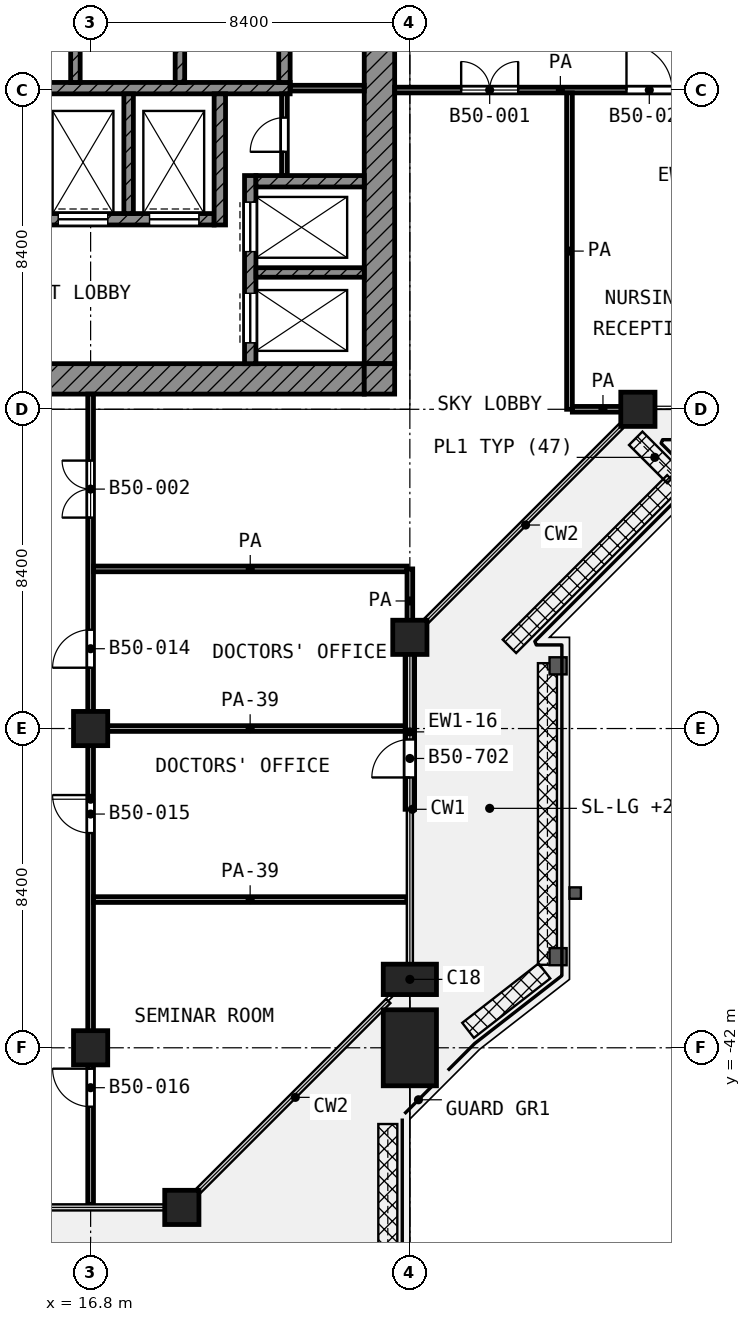
"""IFC4 building model, lengths in metres.
Left out: names, types, materials, properties, quantities, classifications, styles, units other than length and angle.
Written with IfcOpenShell. Run it as: python <this file> out.ifc"""

import sys

from ifc_helpers import new_model, si_unit, direction, frame, frame_2d, origin, origin_2d, place, context, subcontext, project, spatial, rectangle, extrude, element, fill, save


model = new_model("IFC4")
c1 = context("Model", 3, precision=1e-05, world=origin(), true_north=direction((0.0, 1.0)))
c2 = subcontext(c1, "Body", "Model", "MODEL_VIEW")
j1 = project(units=[si_unit("LENGTHUNIT", "METRE"), si_unit("PLANEANGLEUNIT", "RADIAN")], contexts=[c1])
p1 = place(None, origin())
s1 = spatial("IfcSite", under=j1, at=p1, CompositionType="ELEMENT")
p2 = place(p1, origin())
s2 = spatial("IfcBuilding", under=s1, at=p2, CompositionType="ELEMENT")
p3 = place(p2, frame((0.0, 0.0, 218.0)))
s3 = spatial("IfcBuildingStorey", under=s2, at=p3, CompositionType="ELEMENT", Elevation=218.0)
for number, where, z_axis, x_axis in (
    (1, (31.2, -25.2, 0.0), (0.0, 0.0, 1.0), (1.0, 0.0, 0.0)),
    (2, (25.2, -31.2, 0.0), (0.0, 0.0, 1.0), (1.0, 0.0, 0.0)),
    (3, (16.8, -33.6, 0.0), (0.0, 0.0, 1.0), (1.0, 0.0, 0.0)),
):
    element("IfcColumn", number, at=place(p3, frame(where, z_axis=z_axis, x_axis=x_axis)), inside=s3, PredefinedType="COLUMN", context=c2, shape_type="SweptSolid", body=[
        extrude(rectangle(XDim=0.9, YDim=0.9, at=origin_2d()), origin(), (0.0, 0.0, 1.0), 4.2),
    ])
p4 = place(p3, frame((25.2, -40.2, 0.0), z_axis=(0.0, 0.0, 1.0), x_axis=(0.0, -1.0, 0.0)))
e4 = element("IfcColumn", 4, at=p4, inside=s3, PredefinedType="COLUMN", context=c2, shape_type="SweptSolid", body=[
    extrude(rectangle(XDim=0.8, YDim=1.4, at=origin_2d()), origin(), (0.0, 0.0, 1.0), 4.2),
])
for number, where, z_axis, x_axis in (
    (5, (16.8, -42.0, 0.0), (0.0, 0.0, 1.0), (1.0, 0.0, 0.0)),
    (6, (19.2, -46.2, 0.0), (0.0, 0.0, 1.0), (1.0, 0.0, 0.0)),
):
    element("IfcColumn", number, at=place(p3, frame(where, z_axis=z_axis, x_axis=x_axis)), inside=s3, PredefinedType="COLUMN", context=c2, shape_type="SweptSolid", body=[
        extrude(rectangle(XDim=0.9, YDim=0.9, at=origin_2d()), origin(), (0.0, 0.0, 1.0), 4.2),
    ])
p5 = place(p3, frame((25.2, -42.0, 0.0), z_axis=(0.0, 0.0, 1.0), x_axis=(0.0, -1.0, 0.0)))
e7 = element("IfcColumn", 7, at=p5, inside=s3, PredefinedType="COLUMN", context=c2, shape_type="SweptSolid", body=[
    extrude(rectangle(XDim=2.0, YDim=1.4, at=origin_2d()), origin(), (0.0, 0.0, 1.0), 4.2),
])
p6 = place(p3, frame((25.2, -35.725, 0.0), z_axis=(0.0, 0.0, 1.0), x_axis=(0.0, 1.0, 0.0)))
e8 = element("IfcWall", 8, at=p6, inside=s3, PredefinedType="SOLIDWALL", context=c2, shape_type="SweptSolid", body=[
    extrude(rectangle(XDim=4.075, YDim=0.25, at=frame_2d((2.038, 0.0))), origin(), (0.0, 0.0, 1.0), 2.58),
])
p7 = place(p6, frame((0.837, 0.0, 0.0)))
e9 = element("IfcOpeningElement", 9, at=p7, cuts=e8, PredefinedType="OPENING", context=c2, shape_type="SweptSolid", body=[
    extrude(rectangle(XDim=1.0, YDim=2.1, at=frame_2d((0.5, 1.05))), frame((0.0, 0.135, 0.0), z_axis=(0.0, -1.0, 0.0), x_axis=(1.0, 0.0, 0.0)), (0.0, 0.0, 1.0), 0.27),
])
p8 = place(p3, frame((24.4, -24.0, 0.0), z_axis=(0.0, 0.0, 1.0), x_axis=(0.0, 1.0, 0.0)))
e10 = element("IfcWall", 10, at=p8, inside=s3, PredefinedType="SHEAR", context=c2, shape_type="SweptSolid", body=[
    extrude(rectangle(XDim=18.6, YDim=0.8, at=frame_2d((9.3, 0.0))), origin(), (0.0, 0.0, 1.0), 3.6),
])
p9 = place(p8, frame((10.5, 0.0, 0.0)))
e11 = element("IfcOpeningElement", 11, at=p9, cuts=e10, PredefinedType="OPENING", context=c2, shape_type="SweptSolid", body=[
    extrude(rectangle(XDim=1.8, YDim=2.1, at=frame_2d((0.9, 1.05))), frame((0.0, 0.41, 0.0), z_axis=(0.0, -1.0, 0.0), x_axis=(1.0, 0.0, 0.0)), (0.0, 0.0, 1.0), 0.82),
])
p10 = place(p3, frame((5.4, -24.4, 0.0), z_axis=(0.0, 0.0, 1.0), x_axis=(1.0, 0.0, 0.0)))
e12 = element("IfcWall", 12, at=p10, inside=s3, PredefinedType="SHEAR", context=c2, shape_type="SweptSolid", body=[
    extrude(rectangle(XDim=18.6, YDim=0.8, at=frame_2d((9.3, 0.0))), origin(), (0.0, 0.0, 1.0), 3.6),
])
p11 = place(p10, frame((6.3, 0.0, 0.0)))
e13 = element("IfcOpeningElement", 13, at=p11, cuts=e12, PredefinedType="OPENING", context=c2, shape_type="SweptSolid", body=[
    extrude(rectangle(XDim=1.8, YDim=2.1, at=frame_2d((0.9, 1.05))), frame((0.0, 0.41, 0.0), z_axis=(0.0, -1.0, 0.0), x_axis=(1.0, 0.0, 0.0)), (0.0, 0.0, 1.0), 0.82),
])
p12 = place(p3, frame((24.4, -24.8, 0.0), z_axis=(0.0, 0.0, 1.0), x_axis=(0.0, 1.0, 0.0)))
e14 = element("IfcWall", 14, at=p12, inside=s3, PredefinedType="SHEAR", context=c2, shape_type="SweptSolid", body=[
    extrude(rectangle(XDim=0.8, YDim=0.8, at=frame_2d((0.4, 0.0))), origin(), (0.0, 0.0, 1.0), 3.6),
])
p13 = place(p3, frame((5.4, -16.75, 0.0), z_axis=(0.0, 0.0, 1.0), x_axis=(1.0, 0.0, 0.0)))
e15 = element("IfcWall", 15, at=p13, inside=s3, PredefinedType="SHEAR", context=c2, shape_type="SweptSolid", body=[
    extrude(rectangle(XDim=16.65, YDim=0.3, at=frame_2d((8.325, 0.0))), origin(), (0.0, 0.0, 1.0), 3.6),
])
p14 = place(p3, frame((5.4, -20.2, 0.0), z_axis=(0.0, 0.0, 1.0), x_axis=(1.0, 0.0, 0.0)))
e16 = element("IfcWall", 16, at=p14, inside=s3, PredefinedType="SHEAR", context=c2, shape_type="SweptSolid", body=[
    extrude(rectangle(XDim=14.65, YDim=0.3, at=frame_2d((7.325, 0.0))), origin(), (0.0, 0.0, 1.0), 3.6),
])
p15 = place(p14, frame((10.55, 0.0, 0.0)))
e17 = element("IfcOpeningElement", 17, at=p15, cuts=e16, PredefinedType="OPENING", context=c2, shape_type="SweptSolid", body=[
    extrude(rectangle(XDim=1.3, YDim=2.1, at=frame_2d((0.65, 1.05))), frame((0.0, 0.16, 0.0), z_axis=(0.0, -1.0, 0.0), x_axis=(1.0, 0.0, 0.0)), (0.0, 0.0, 1.0), 0.32),
])
p16 = place(p14, frame((12.95, 0.0, 0.0)))
e18 = element("IfcOpeningElement", 18, at=p16, cuts=e16, PredefinedType="OPENING", context=c2, shape_type="SweptSolid", body=[
    extrude(rectangle(XDim=1.3, YDim=2.1, at=frame_2d((0.65, 1.05))), frame((0.0, 0.16, 0.0), z_axis=(0.0, -1.0, 0.0), x_axis=(1.0, 0.0, 0.0)), (0.0, 0.0, 1.0), 0.32),
])
p17 = place(p14, frame((0.55, 0.0, 0.0)))
e19 = element("IfcOpeningElement", 19, at=p17, cuts=e16, PredefinedType="OPENING", context=c2, shape_type="SweptSolid", body=[
    extrude(rectangle(XDim=1.3, YDim=2.1, at=frame_2d((0.65, 1.05))), frame((0.0, 0.16, 0.0), z_axis=(0.0, -1.0, 0.0), x_axis=(1.0, 0.0, 0.0)), (0.0, 0.0, 1.0), 0.32),
])
p18 = place(p14, frame((2.95, 0.0, 0.0)))
e20 = element("IfcOpeningElement", 20, at=p18, cuts=e16, PredefinedType="OPENING", context=c2, shape_type="SweptSolid", body=[
    extrude(rectangle(XDim=1.3, YDim=2.1, at=frame_2d((0.65, 1.05))), frame((0.0, 0.16, 0.0), z_axis=(0.0, -1.0, 0.0), x_axis=(1.0, 0.0, 0.0)), (0.0, 0.0, 1.0), 0.32),
])
p19 = place(p14, frame((5.95, 0.0, 0.0)))
e21 = element("IfcOpeningElement", 21, at=p19, cuts=e16, PredefinedType="OPENING", context=c2, shape_type="SweptSolid", body=[
    extrude(rectangle(XDim=0.9, YDim=2.1, at=frame_2d((0.45, 1.05))), frame((0.0, 0.16, 0.0), z_axis=(0.0, -1.0, 0.0), x_axis=(1.0, 0.0, 0.0)), (0.0, 0.0, 1.0), 0.32),
])
p20 = place(p14, frame((8.35, 0.0, 0.0)))
e22 = element("IfcOpeningElement", 22, at=p20, cuts=e16, PredefinedType="OPENING", context=c2, shape_type="SweptSolid", body=[
    extrude(rectangle(XDim=0.9, YDim=2.1, at=frame_2d((0.45, 1.05))), frame((0.0, 0.16, 0.0), z_axis=(0.0, -1.0, 0.0), x_axis=(1.0, 0.0, 0.0)), (0.0, 0.0, 1.0), 0.32),
])
p21 = place(p3, frame((20.2, -20.35, 0.0), z_axis=(0.0, 0.0, 1.0), x_axis=(0.0, 1.0, 0.0)))
e23 = element("IfcWall", 23, at=p21, inside=s3, PredefinedType="SHEAR", context=c2, shape_type="SweptSolid", body=[
    extrude(rectangle(XDim=3.45, YDim=0.3, at=frame_2d((1.725, 0.0))), origin(), (0.0, 0.0, 1.0), 3.6),
])
p22 = place(p3, frame((21.9, -16.6, 0.0), z_axis=(0.0, 0.0, 1.0), x_axis=(0.0, 1.0, 0.0)))
e24 = element("IfcWall", 24, at=p22, inside=s3, PredefinedType="SHEAR", context=c2, shape_type="SweptSolid", body=[
    extrude(rectangle(XDim=2.35, YDim=0.3, at=frame_2d((1.175, 0.0))), origin(), (0.0, 0.0, 1.0), 3.6),
])
p23 = place(p3, frame((21.15, -19.2, 0.0), z_axis=(0.0, 0.0, 1.0), x_axis=(1.0, 0.0, 0.0)))
e25 = element("IfcWall", 25, at=p23, inside=s3, PredefinedType="SHEAR", context=c2, shape_type="SweptSolid", body=[
    extrude(rectangle(XDim=2.85, YDim=0.3, at=frame_2d((1.425, 0.0))), origin(), (0.0, 0.0, 1.0), 3.6),
])
p24 = place(p3, frame((21.0, -24.0, 0.0), z_axis=(0.0, 0.0, 1.0), x_axis=(0.0, 1.0, 0.0)))
e26 = element("IfcWall", 26, at=p24, inside=s3, PredefinedType="SHEAR", context=c2, shape_type="SweptSolid", body=[
    extrude(rectangle(XDim=4.95, YDim=0.3, at=frame_2d((2.475, 0.0))), origin(), (0.0, 0.0, 1.0), 3.6),
])
p25 = place(p24, frame((2.95, 0.0, 0.0)))
e27 = element("IfcOpeningElement", 27, at=p25, cuts=e26, PredefinedType="OPENING", context=c2, shape_type="SweptSolid", body=[
    extrude(rectangle(XDim=1.3, YDim=2.1, at=frame_2d((0.65, 1.05))), frame((0.0, 0.16, 0.0), z_axis=(0.0, -1.0, 0.0), x_axis=(1.0, 0.0, 0.0)), (0.0, 0.0, 1.0), 0.32),
])
p26 = place(p24, frame((0.55, 0.0, 0.0)))
e28 = element("IfcOpeningElement", 28, at=p26, cuts=e26, PredefinedType="OPENING", context=c2, shape_type="SweptSolid", body=[
    extrude(rectangle(XDim=1.3, YDim=2.1, at=frame_2d((0.65, 1.05))), frame((0.0, 0.16, 0.0), z_axis=(0.0, -1.0, 0.0), x_axis=(1.0, 0.0, 0.0)), (0.0, 0.0, 1.0), 0.32),
])
p27 = place(p3, frame((21.15, -21.6, 0.0), z_axis=(0.0, 0.0, 1.0), x_axis=(1.0, 0.0, 0.0)))
e29 = element("IfcWall", 29, at=p27, inside=s3, PredefinedType="SHEAR", context=c2, shape_type="SweptSolid", body=[
    extrude(rectangle(XDim=2.85, YDim=0.25, at=frame_2d((1.425, 0.0))), origin(), (0.0, 0.0, 1.0), 3.6),
])
p28 = place(p3, frame((17.8, -20.05, 0.0), z_axis=(0.0, 0.0, 1.0), x_axis=(0.0, 1.0, 0.0)))
e30 = element("IfcWall", 30, at=p28, inside=s3, PredefinedType="SHEAR", context=c2, shape_type="SweptSolid", body=[
    extrude(rectangle(XDim=3.15, YDim=0.25, at=frame_2d((1.575, 0.0))), origin(), (0.0, 0.0, 1.0), 3.6),
])
for number, where, z_axis, x_axis in (
    (31, (16.4, -16.6, 0.0), (0.0, 0.0, 1.0), (0.0, 1.0, 0.0)),
    (32, (19.15, -16.6, 0.0), (0.0, 0.0, 1.0), (0.0, 1.0, 0.0)),
):
    element("IfcWall", number, at=place(p3, frame(where, z_axis=z_axis, x_axis=x_axis)), inside=s3, PredefinedType="SHEAR", context=c2, shape_type="SweptSolid", body=[
        extrude(rectangle(XDim=2.35, YDim=0.25, at=frame_2d((1.175, 0.0))), origin(), (0.0, 0.0, 1.0), 3.6),
    ])
p29 = place(p3, frame((21.9, -19.05, 0.0), z_axis=(0.0, 0.0, 1.0), x_axis=(0.0, 1.0, 0.0)))
e33 = element("IfcWall", 33, at=p29, inside=s3, PredefinedType="PARTITIONING", context=c2, shape_type="SweptSolid", body=[
    extrude(rectangle(XDim=2.15, YDim=0.15, at=frame_2d((1.075, 0.0))), origin(), (0.0, 0.0, 1.0), 3.6),
])
p30 = place(p29, frame((0.625, 0.0, 0.0)))
e34 = element("IfcOpeningElement", 34, at=p30, cuts=e33, PredefinedType="OPENING", context=c2, shape_type="SweptSolid", body=[
    extrude(rectangle(XDim=0.9, YDim=2.1, at=frame_2d((0.45, 1.05))), frame((0.0, 0.085, 0.0), z_axis=(0.0, -1.0, 0.0), x_axis=(1.0, 0.0, 0.0)), (0.0, 0.0, 1.0), 0.17),
])
p31 = place(p3, frame((22.05, -16.75, 0.0), z_axis=(0.0, 0.0, 1.0), x_axis=(1.0, 0.0, 0.0)))
e35 = element("IfcWall", 35, at=p31, inside=s3, PredefinedType="PARTITIONING", context=c2, shape_type="SweptSolid", body=[
    extrude(rectangle(XDim=1.95, YDim=0.15, at=frame_2d((0.975, 0.0))), origin(), (0.0, 0.0, 1.0), 3.6),
])
for number, where, z_axis, x_axis in (
    (36, (16.875, -38.1, 0.0), (0.0, 0.0, 1.0), (1.0, 0.0, 0.0)),
    (37, (16.875, -33.6, 0.0), (0.0, 0.0, 1.0), (1.0, 0.0, 0.0)),
):
    element("IfcWall", number, at=place(p3, frame(where, z_axis=z_axis, x_axis=x_axis)), inside=s3, PredefinedType="PARTITIONING", context=c2, shape_type="SweptSolid", body=[
        extrude(rectangle(XDim=8.245, YDim=0.15, at=frame_2d((4.123, 0.0))), origin(), (0.0, 0.0, 1.0), 2.7),
    ])
p32 = place(p3, frame((16.875, -29.4, 0.0), z_axis=(0.0, 0.0, 1.0), x_axis=(1.0, 0.0, 0.0)))
e38 = element("IfcWall", 38, at=p32, inside=s3, PredefinedType="PARTITIONING", context=c2, shape_type="SweptSolid", body=[
    extrude(rectangle(XDim=8.25, YDim=0.15, at=frame_2d((4.125, 0.0))), origin(), (0.0, 0.0, 1.0), 3.6),
])
p33 = place(p3, frame((29.475, -25.2, 0.0), z_axis=(0.0, 0.0, 1.0), x_axis=(1.0, 0.0, 0.0)))
e39 = element("IfcWall", 39, at=p33, inside=s3, PredefinedType="PARTITIONING", context=c2, shape_type="SweptSolid", body=[
    extrude(rectangle(XDim=1.612, YDim=0.15, at=frame_2d((0.806, 0.0))), origin(), (0.0, 0.0, 1.0), 3.6),
])
p34 = place(p3, frame((24.8, -16.8, 0.0), z_axis=(0.0, 0.0, 1.0), x_axis=(1.0, 0.0, 0.0)))
e40 = element("IfcWall", 40, at=p34, inside=s3, PredefinedType="PARTITIONING", context=c2, shape_type="SweptSolid", body=[
    extrude(rectangle(XDim=8.72, YDim=0.15, at=frame_2d((4.36, 0.0))), origin(), (0.0, 0.0, 1.0), 3.6),
])
p35 = place(p34, frame((1.75, 0.0, 0.0)))
e41 = element("IfcOpeningElement", 41, at=p35, cuts=e40, PredefinedType="OPENING", context=c2, shape_type="SweptSolid", body=[
    extrude(rectangle(XDim=1.5, YDim=2.1, at=frame_2d((0.75, 1.05))), frame((0.0, 0.085, 0.0), z_axis=(0.0, -1.0, 0.0), x_axis=(1.0, 0.0, 0.0)), (0.0, 0.0, 1.0), 0.17),
])
p36 = place(p34, frame((6.1, 0.0, 0.0)))
e42 = element("IfcOpeningElement", 42, at=p36, cuts=e40, PredefinedType="OPENING", context=c2, shape_type="SweptSolid", body=[
    extrude(rectangle(XDim=1.2, YDim=2.1, at=frame_2d((0.6, 1.05))), frame((0.0, 0.085, 0.0), z_axis=(0.0, -1.0, 0.0), x_axis=(1.0, 0.0, 0.0)), (0.0, 0.0, 1.0), 0.17),
])
p37 = place(p3, frame((16.8, -46.12, 0.0), z_axis=(0.0, 0.0, 1.0), x_axis=(0.0, 1.0, 0.0)))
e43 = element("IfcWall", 43, at=p37, inside=s3, PredefinedType="PARTITIONING", context=c2, shape_type="SweptSolid", body=[
    extrude(rectangle(XDim=21.32, YDim=0.15, at=frame_2d((10.66, 0.0))), origin(), (0.0, 0.0, 1.0), 3.6),
])
p38 = place(p37, frame((18.07, 0.0, 0.0)))
e44 = element("IfcOpeningElement", 44, at=p38, cuts=e43, PredefinedType="OPENING", context=c2, shape_type="SweptSolid", body=[
    extrude(rectangle(XDim=1.5, YDim=2.1, at=frame_2d((0.75, 1.05))), frame((0.0, 0.085, 0.0), z_axis=(0.0, -1.0, 0.0), x_axis=(1.0, 0.0, 0.0)), (0.0, 0.0, 1.0), 0.17),
])
p39 = place(p37, frame((14.12, 0.0, 0.0)))
e45 = element("IfcOpeningElement", 45, at=p39, cuts=e43, PredefinedType="OPENING", context=c2, shape_type="SweptSolid", body=[
    extrude(rectangle(XDim=1.0, YDim=2.1, at=frame_2d((0.5, 1.05))), frame((0.0, 0.085, 0.0), z_axis=(0.0, -1.0, 0.0), x_axis=(1.0, 0.0, 0.0)), (0.0, 0.0, 1.0), 0.17),
])
p40 = place(p37, frame((9.77, 0.0, 0.0)))
e46 = element("IfcOpeningElement", 46, at=p40, cuts=e43, PredefinedType="OPENING", context=c2, shape_type="SweptSolid", body=[
    extrude(rectangle(XDim=1.0, YDim=2.1, at=frame_2d((0.5, 1.05))), frame((0.0, 0.085, 0.0), z_axis=(0.0, -1.0, 0.0), x_axis=(1.0, 0.0, 0.0)), (0.0, 0.0, 1.0), 0.17),
])
p41 = place(p37, frame((2.57, 0.0, 0.0)))
e47 = element("IfcOpeningElement", 47, at=p41, cuts=e43, PredefinedType="OPENING", context=c2, shape_type="SweptSolid", body=[
    extrude(rectangle(XDim=1.0, YDim=2.1, at=frame_2d((0.5, 1.05))), frame((0.0, 0.085, 0.0), z_axis=(0.0, -1.0, 0.0), x_axis=(1.0, 0.0, 0.0)), (0.0, 0.0, 1.0), 0.17),
])
p42 = place(p3, frame((25.2, -31.087, 0.0), z_axis=(0.0, 0.0, 1.0), x_axis=(0.0, 1.0, 0.0)))
e48 = element("IfcWall", 48, at=p42, inside=s3, PredefinedType="PARTITIONING", context=c2, shape_type="SweptSolid", body=[
    extrude(rectangle(XDim=1.687, YDim=0.15, at=frame_2d((0.844, 0.0))), origin(), (0.0, 0.0, 1.0), 3.6),
])
p43 = place(p3, frame((29.4, -25.2, 0.0), z_axis=(0.0, 0.0, 1.0), x_axis=(0.0, 1.0, 0.0)))
e49 = element("IfcWall", 49, at=p43, inside=s3, PredefinedType="PARTITIONING", context=c2, shape_type="SweptSolid", body=[
    extrude(rectangle(XDim=8.325, YDim=0.15, at=frame_2d((4.163, 0.0))), origin(), (0.0, 0.0, 1.0), 3.6),
])
p44 = place(p7, origin())
e50 = element("IfcDoor", 50, at=p44, inside=s3, OperationType="SINGLE_SWING_LEFT", PredefinedType="DOOR", context=c2, shape_type="SweptSolid", body=[
    extrude(rectangle(XDim=1.0, YDim=2.1, at=frame_2d((0.5, 1.05))), frame((0.0, 0.025, 0.0), z_axis=(0.0, -1.0, 0.0), x_axis=(1.0, 0.0, 0.0)), (0.0, 0.0, 1.0), 0.05),
])
fill(e9, e50)
p45 = place(p25, origin())
e51 = element("IfcDoor", 51, at=p45, inside=s3, OperationType="DOUBLE_DOOR_SLIDING", PredefinedType="DOOR", context=c2, shape_type="SweptSolid", body=[
    extrude(rectangle(XDim=1.3, YDim=2.1, at=frame_2d((0.65, 1.05))), frame((0.0, 0.025, 0.0), z_axis=(0.0, -1.0, 0.0), x_axis=(1.0, 0.0, 0.0)), (0.0, 0.0, 1.0), 0.05),
])
fill(e27, e51)
p46 = place(p26, origin())
e52 = element("IfcDoor", 52, at=p46, inside=s3, OperationType="DOUBLE_DOOR_SLIDING", PredefinedType="DOOR", context=c2, shape_type="SweptSolid", body=[
    extrude(rectangle(XDim=1.3, YDim=2.1, at=frame_2d((0.65, 1.05))), frame((0.0, 0.025, 0.0), z_axis=(0.0, -1.0, 0.0), x_axis=(1.0, 0.0, 0.0)), (0.0, 0.0, 1.0), 0.05),
])
fill(e28, e52)
p47 = place(p15, origin())
e53 = element("IfcDoor", 53, at=p47, inside=s3, OperationType="DOUBLE_DOOR_SLIDING", PredefinedType="DOOR", context=c2, shape_type="SweptSolid", body=[
    extrude(rectangle(XDim=1.3, YDim=2.1, at=frame_2d((0.65, 1.05))), frame((0.0, 0.025, 0.0), z_axis=(0.0, -1.0, 0.0), x_axis=(1.0, 0.0, 0.0)), (0.0, 0.0, 1.0), 0.05),
])
fill(e17, e53)
p48 = place(p16, origin())
e54 = element("IfcDoor", 54, at=p48, inside=s3, OperationType="DOUBLE_DOOR_SLIDING", PredefinedType="DOOR", context=c2, shape_type="SweptSolid", body=[
    extrude(rectangle(XDim=1.3, YDim=2.1, at=frame_2d((0.65, 1.05))), frame((0.0, 0.025, 0.0), z_axis=(0.0, -1.0, 0.0), x_axis=(1.0, 0.0, 0.0)), (0.0, 0.0, 1.0), 0.05),
])
fill(e18, e54)
p49 = place(p30, origin())
e55 = element("IfcDoor", 55, at=p49, inside=s3, OperationType="SINGLE_SWING_LEFT", PredefinedType="DOOR", context=c2, shape_type="SweptSolid", body=[
    extrude(rectangle(XDim=0.9, YDim=2.1, at=frame_2d((0.45, 1.05))), frame((0.0, 0.025, 0.0), z_axis=(0.0, -1.0, 0.0), x_axis=(1.0, 0.0, 0.0)), (0.0, 0.0, 1.0), 0.05),
])
fill(e34, e55)
p50 = place(p35, origin())
e56 = element("IfcDoor", 56, at=p50, inside=s3, OperationType="DOUBLE_DOOR_SINGLE_SWING", PredefinedType="DOOR", context=c2, shape_type="SweptSolid", body=[
    extrude(rectangle(XDim=1.5, YDim=2.1, at=frame_2d((0.75, 1.05))), frame((0.0, 0.025, 0.0), z_axis=(0.0, -1.0, 0.0), x_axis=(1.0, 0.0, 0.0)), (0.0, 0.0, 1.0), 0.05),
])
fill(e41, e56)
p51 = place(p38, origin())
e57 = element("IfcDoor", 57, at=p51, inside=s3, OperationType="DOUBLE_DOOR_SINGLE_SWING", PredefinedType="DOOR", context=c2, shape_type="SweptSolid", body=[
    extrude(rectangle(XDim=1.5, YDim=2.1, at=frame_2d((0.75, 1.05))), frame((0.0, 0.025, 0.0), z_axis=(0.0, -1.0, 0.0), x_axis=(1.0, 0.0, 0.0)), (0.0, 0.0, 1.0), 0.05),
])
fill(e44, e57)
p52 = place(p36, origin())
e58 = element("IfcDoor", 58, at=p52, inside=s3, OperationType="SINGLE_SWING_LEFT", PredefinedType="DOOR", context=c2, shape_type="SweptSolid", body=[
    extrude(rectangle(XDim=1.2, YDim=2.1, at=frame_2d((0.6, 1.05))), frame((0.0, 0.025, 0.0), z_axis=(0.0, -1.0, 0.0), x_axis=(1.0, 0.0, 0.0)), (0.0, 0.0, 1.0), 0.05),
])
fill(e42, e58)
p53 = place(p39, origin())
e59 = element("IfcDoor", 59, at=p53, inside=s3, OperationType="SINGLE_SWING_LEFT", PredefinedType="DOOR", context=c2, shape_type="SweptSolid", body=[
    extrude(rectangle(XDim=1.0, YDim=2.1, at=frame_2d((0.5, 1.05))), frame((0.0, 0.025, 0.0), z_axis=(0.0, -1.0, 0.0), x_axis=(1.0, 0.0, 0.0)), (0.0, 0.0, 1.0), 0.05),
])
fill(e45, e59)
p54 = place(p40, origin())
e60 = element("IfcDoor", 60, at=p54, inside=s3, OperationType="SINGLE_SWING_RIGHT", PredefinedType="DOOR", context=c2, shape_type="SweptSolid", body=[
    extrude(rectangle(XDim=1.0, YDim=2.1, at=frame_2d((0.5, 1.05))), frame((0.0, 0.025, 0.0), z_axis=(0.0, -1.0, 0.0), x_axis=(1.0, 0.0, 0.0)), (0.0, 0.0, 1.0), 0.05),
])
fill(e46, e60)
p55 = place(p41, origin())
e61 = element("IfcDoor", 61, at=p55, inside=s3, OperationType="SINGLE_SWING_RIGHT", PredefinedType="DOOR", context=c2, shape_type="SweptSolid", body=[
    extrude(rectangle(XDim=1.0, YDim=2.1, at=frame_2d((0.5, 1.05))), frame((0.0, 0.025, 0.0), z_axis=(0.0, -1.0, 0.0), x_axis=(1.0, 0.0, 0.0)), (0.0, 0.0, 1.0), 0.05),
])
fill(e47, e61)
save(model, sys.argv[1])
